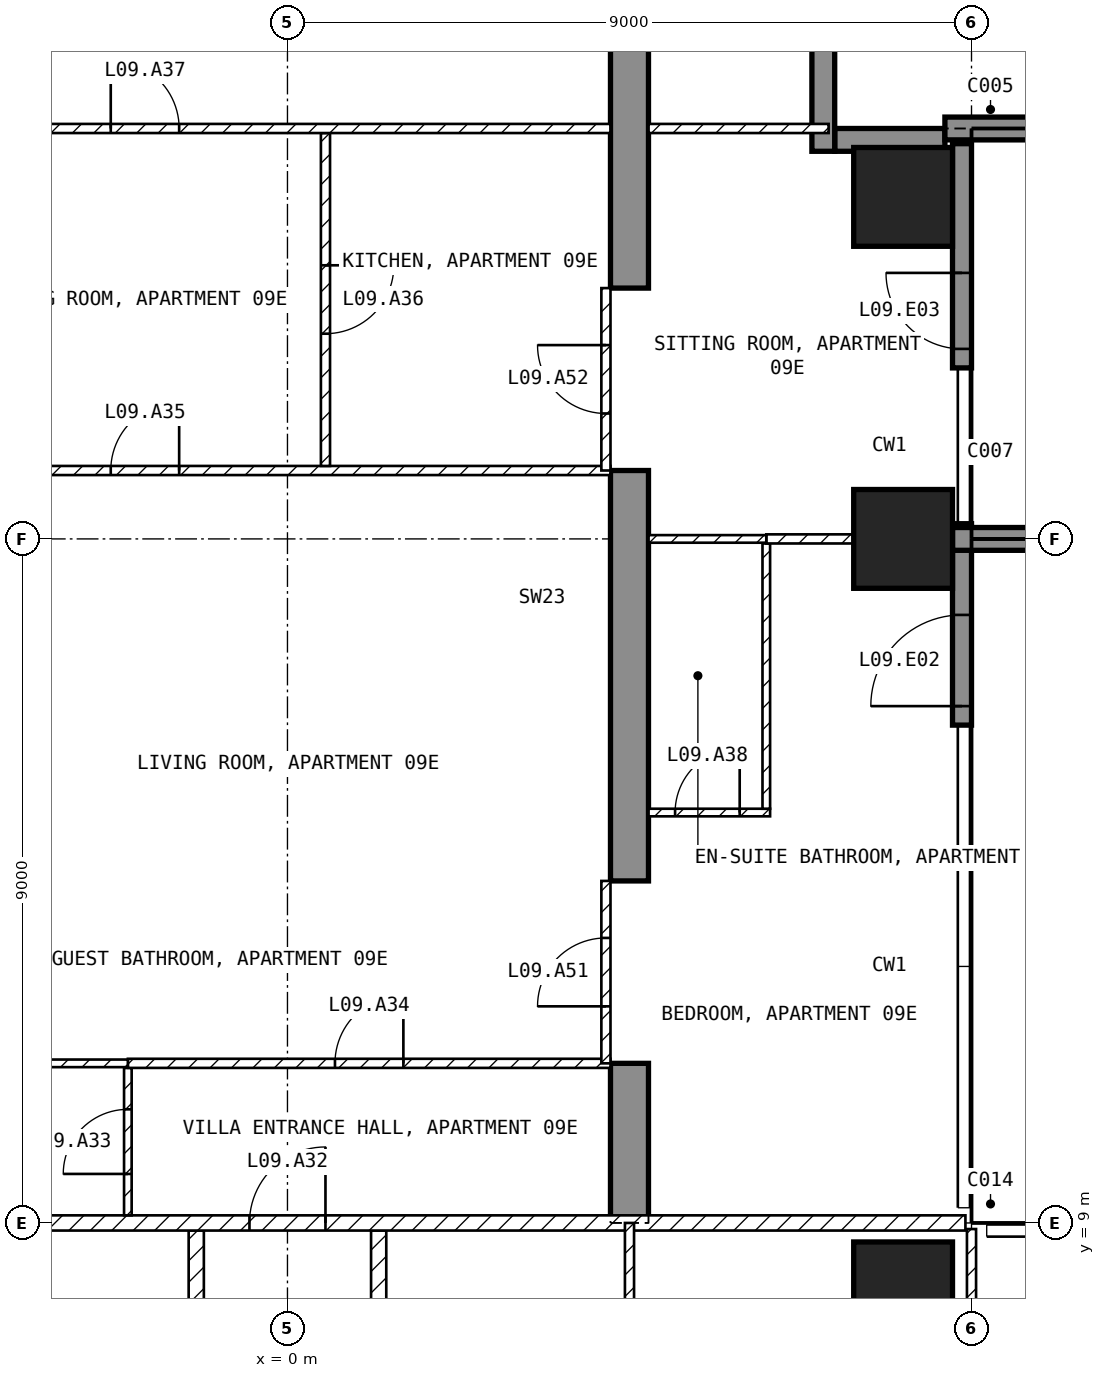
"""IFC4 building model, lengths in metres.
Left out: names, types, materials, properties, quantities, classifications, styles, units other than length and angle.
Written with IfcOpenShell. Run it as: python <this file> out.ifc"""

import sys

from ifc_helpers import new_model, si_unit, direction, frame, frame_2d, origin, origin_2d, place, context, subcontext, project, spatial, polyline, rectangle, outline, extrude, element, fill, save


model = new_model("IFC4")
c1 = context("Model", 3, precision=1e-05, world=origin(), true_north=direction((0.0, 1.0)))
c2 = subcontext(c1, "Body", "Model", "MODEL_VIEW")
j1 = project(units=[si_unit("LENGTHUNIT", "METRE"), si_unit("PLANEANGLEUNIT", "RADIAN")], contexts=[c1])
p1 = place(None, origin())
s1 = spatial("IfcSite", under=j1, at=p1, CompositionType="ELEMENT")
p2 = place(p1, origin())
s2 = spatial("IfcBuilding", under=s1, at=p2, CompositionType="ELEMENT")
p3 = place(p2, frame((0.0, 0.0, 50.5)))
s3 = spatial("IfcBuildingStorey", under=s2, at=p3, CompositionType="ELEMENT", Elevation=50.5)
for number, where, z_axis, x_axis in (
    (1, (8.1, 8.1, -0.25), (0.0, 0.0, 1.0), (1.0, 0.0, 0.0)),
    (2, (8.1, 18.0, -0.25), (0.0, 0.0, 1.0), (1.0, 0.0, 0.0)),
    (3, (8.1, 22.5, -0.25), (0.0, 0.0, 1.0), (1.0, 0.0, 0.0)),
):
    element("IfcColumn", number, at=place(p3, frame(where, z_axis=z_axis, x_axis=x_axis)), inside=s3, PredefinedType="COLUMN", context=c2, shape_type="SweptSolid", body=[
        extrude(rectangle(XDim=1.3, YDim=1.3, at=origin_2d()), origin(), (0.0, 0.0, 1.0), 3.5),
    ])
p4 = place(p3, frame((4.25, 9.0, -0.25), z_axis=(1.0, 0.0, 0.0), x_axis=(0.0, 1.0, 0.0)))
e4 = element("IfcWall", 4, at=p4, inside=s3, PredefinedType="SHEAR", context=c2, shape_type="SweptSolid", body=[
    extrude(outline(polyline([(0.0, 0.0), (2.1, 0.0), (2.1, 2.65), (4.5, 2.65), (4.5, 0.0), (9.9, 0.0), (9.9, 2.65), (12.3, 2.65), (12.3, 0.0), (16.45, 0.0), (16.45, 3.5), (0.0, 3.5), (0.0, 0.0)])), origin(), (0.0, 0.0, 1.0), 0.5),
])
p5 = place(p3, frame((8.875, 15.55, 0.0), z_axis=(0.0, 0.0, 1.0), x_axis=(0.0, 1.0, 0.0)))
e5 = element("IfcWall", 5, at=p5, inside=s3, PredefinedType="SOLIDWALL", context=c2, shape_type="SweptSolid", body=[
    extrude(rectangle(XDim=2.65, YDim=0.25, at=frame_2d((1.325, 0.0))), origin(), (0.0, 0.0, 1.0), 3.25),
])
p6 = place(p5, frame((0.25, 0.0, 0.0)))
e6 = element("IfcOpeningElement", 6, at=p6, cuts=e5, PredefinedType="OPENING", context=c2, shape_type="SweptSolid", body=[
    extrude(rectangle(XDim=1.2, YDim=2.4, at=frame_2d((0.6, 1.2))), frame((0.0, 0.135, 0.0), z_axis=(0.0, -1.0, 0.0), x_axis=(1.0, 0.0, 0.0)), (0.0, 0.0, 1.0), 0.27),
])
p7 = place(p3, frame((8.875, 20.25, 0.0), z_axis=(0.0, 0.0, 1.0), x_axis=(0.0, 1.0, 0.0)))
e7 = element("IfcWall", 7, at=p7, inside=s3, PredefinedType="SOLIDWALL", context=c2, shape_type="SweptSolid", body=[
    extrude(rectangle(XDim=2.95, YDim=0.25, at=frame_2d((1.475, 0.0))), origin(), (0.0, 0.0, 1.0), 3.25),
])
p8 = place(p7, frame((0.25, 0.0, 0.0)))
e8 = element("IfcOpeningElement", 8, at=p8, cuts=e7, PredefinedType="OPENING", context=c2, shape_type="SweptSolid", body=[
    extrude(rectangle(XDim=1.0, YDim=2.4, at=frame_2d((0.5, 1.2))), frame((0.0, 0.135, 0.0), z_axis=(0.0, -1.0, 0.0), x_axis=(1.0, 0.0, 0.0)), (0.0, 0.0, 1.0), 0.27),
])
p9 = place(p3, frame((8.65, 23.25, 0.0), z_axis=(0.0, 0.0, 1.0), x_axis=(-1.0, 0.0, 0.0)))
e9 = element("IfcWall", 9, at=p9, inside=s3, PredefinedType="SOLIDWALL", context=c2, shape_type="SweptSolid", body=[
    extrude(rectangle(XDim=1.45, YDim=0.3, at=frame_2d((0.725, 0.0))), origin(), (0.0, 0.0, 1.0), 3.25),
])
p10 = place(p3, frame((7.05, 23.1, 0.0), z_axis=(0.0, 0.0, 1.0), x_axis=(0.0, 1.0, 0.0)))
e10 = element("IfcWall", 10, at=p10, inside=s3, PredefinedType="SOLIDWALL", context=c2, shape_type="SweptSolid", body=[
    extrude(rectangle(XDim=1.8, YDim=0.3, at=frame_2d((0.9, 0.0))), origin(), (0.0, 0.0, 1.0), 3.25),
])
p11 = place(p3, frame((8.75, 18.0, 0.0), z_axis=(0.0, 0.0, 1.0), x_axis=(1.0, 0.0, 0.0)))
e11 = element("IfcWall", 11, at=p11, inside=s3, PredefinedType="SOLIDWALL", context=c2, shape_type="SweptSolid", body=[
    extrude(rectangle(XDim=2.95, YDim=0.3, at=frame_2d((1.475, 0.0))), origin(), (0.0, 0.0, 1.0), 3.25),
])
p12 = place(p3, frame((8.65, 23.4, 0.0), z_axis=(0.0, 0.0, 1.0), x_axis=(1.0, 0.0, 0.0)))
e12 = element("IfcWall", 12, at=p12, inside=s3, PredefinedType="SOLIDWALL", context=c2, shape_type="SweptSolid", body=[
    extrude(rectangle(XDim=3.05, YDim=0.3, at=frame_2d((1.525, 0.0))), origin(), (0.0, 0.0, 1.0), 3.25),
])
for number, where, z_axis, x_axis in (
    (13, (1.2, 8.9, 0.0), (0.0, 0.0, 1.0), (0.0, -1.0, 0.0)),
    (14, (-1.2, 1.3, 0.0), (0.0, 0.0, 1.0), (0.0, 1.0, 0.0)),
):
    element("IfcWall", number, at=place(p3, frame(where, z_axis=z_axis, x_axis=x_axis)), inside=s3, PredefinedType="PARTITIONING", context=c2, shape_type="SweptSolid", body=[
        extrude(rectangle(XDim=7.6, YDim=0.2, at=frame_2d((3.8, 0.0))), origin(), (0.0, 0.0, 1.0), 3.25),
    ])
p13 = place(p3, frame((-8.92, 9.0, 0.0), z_axis=(0.0, 0.0, 1.0), x_axis=(1.0, 0.0, 0.0)))
e15 = element("IfcWall", 15, at=p13, inside=s3, PredefinedType="PARTITIONING", context=c2, shape_type="SweptSolid", body=[
    extrude(rectangle(XDim=17.84, YDim=0.2, at=frame_2d((8.92, 0.0))), origin(), (0.0, 0.0, 1.0), 3.25),
])
p14 = place(p13, frame((8.42, 0.0, 0.0)))
e16 = element("IfcOpeningElement", 16, at=p14, cuts=e15, PredefinedType="OPENING", context=c2, shape_type="SweptSolid", body=[
    extrude(rectangle(XDim=1.0, YDim=2.1, at=frame_2d((0.5, 1.05))), frame((0.0, 0.11, 0.0), z_axis=(0.0, -1.0, 0.0), x_axis=(1.0, 0.0, 0.0)), (0.0, 0.0, 1.0), 0.22),
])
p15 = place(p3, frame((9.0, 1.3, 0.0), z_axis=(0.0, 0.0, 1.0), x_axis=(0.0, 1.0, 0.0)))
e17 = element("IfcWall", 17, at=p15, inside=s3, PredefinedType="PARTITIONING", context=c2, shape_type="SweptSolid", body=[
    extrude(rectangle(XDim=7.62, YDim=0.12, at=frame_2d((3.81, 0.0))), origin(), (0.0, 0.0, 1.0), 3.25),
])
p16 = place(p15, frame((0.85, 0.0, 0.0)))
e18 = element("IfcOpeningElement", 18, at=p16, cuts=e17, PredefinedType="OPENING", context=c2, shape_type="SweptSolid", body=[
    extrude(rectangle(XDim=0.9, YDim=2.1, at=frame_2d((0.45, 1.05))), frame((0.0, 0.07, 0.0), z_axis=(0.0, -1.0, 0.0), x_axis=(1.0, 0.0, 0.0)), (0.0, 0.0, 1.0), 0.14),
])
p17 = place(p3, frame((4.5, 1.3, 0.0), z_axis=(0.0, 0.0, 1.0), x_axis=(0.0, 1.0, 0.0)))
e19 = element("IfcWall", 19, at=p17, inside=s3, PredefinedType="PARTITIONING", context=c2, shape_type="SweptSolid", body=[
    extrude(rectangle(XDim=7.7, YDim=0.12, at=frame_2d((3.85, 0.0))), origin(), (0.0, 0.0, 1.0), 3.25),
])
p18 = place(p17, frame((3.4, 0.0, 0.0)))
e20 = element("IfcOpeningElement", 20, at=p18, cuts=e19, PredefinedType="OPENING", context=c2, shape_type="SweptSolid", body=[
    extrude(rectangle(XDim=0.9, YDim=2.1, at=frame_2d((0.45, 1.05))), frame((0.0, 0.07, 0.0), z_axis=(0.0, -1.0, 0.0), x_axis=(1.0, 0.0, 0.0)), (0.0, 0.0, 1.0), 0.14),
])
p19 = place(p3, frame((-2.1, 9.1, 0.0), z_axis=(0.0, 0.0, 1.0), x_axis=(0.0, 1.0, 0.0)))
e21 = element("IfcWall", 21, at=p19, inside=s3, PredefinedType="PARTITIONING", context=c2, shape_type="SweptSolid", body=[
    extrude(rectangle(XDim=1.94, YDim=0.1, at=frame_2d((0.97, 0.0))), origin(), (0.0, 0.0, 1.0), 3.25),
])
p20 = place(p19, frame((0.545, 0.0, 0.0)))
e22 = element("IfcOpeningElement", 22, at=p20, cuts=e21, PredefinedType="OPENING", context=c2, shape_type="SweptSolid", body=[
    extrude(rectangle(XDim=0.85, YDim=2.1, at=frame_2d((0.425, 1.05))), frame((0.0, 0.06, 0.0), z_axis=(0.0, -1.0, 0.0), x_axis=(1.0, 0.0, 0.0)), (0.0, 0.0, 1.0), 0.12),
])
p21 = place(p3, frame((-2.1, 11.1, 0.0), z_axis=(0.0, 0.0, 1.0), x_axis=(1.0, 0.0, 0.0)))
e23 = element("IfcWall", 23, at=p21, inside=s3, PredefinedType="PARTITIONING", context=c2, shape_type="SweptSolid", body=[
    extrude(rectangle(XDim=6.35, YDim=0.12, at=frame_2d((3.175, 0.0))), origin(), (0.0, 0.0, 1.0), 3.25),
])
p22 = place(p21, frame((2.725, 0.0, 0.0)))
e24 = element("IfcOpeningElement", 24, at=p22, cuts=e23, PredefinedType="OPENING", context=c2, shape_type="SweptSolid", body=[
    extrude(rectangle(XDim=0.9, YDim=2.1, at=frame_2d((0.45, 1.05))), frame((0.0, 0.07, 0.0), z_axis=(0.0, -1.0, 0.0), x_axis=(1.0, 0.0, 0.0)), (0.0, 0.0, 1.0), 0.14),
])
p23 = place(p3, frame((-4.25, 11.1, 0.0), z_axis=(0.0, 0.0, 1.0), x_axis=(1.0, 0.0, 0.0)))
e25 = element("IfcWall", 25, at=p23, inside=s3, PredefinedType="PARTITIONING", context=c2, shape_type="SweptSolid", body=[
    extrude(rectangle(XDim=2.15, YDim=0.1, at=frame_2d((1.075, 0.0))), origin(), (0.0, 0.0, 1.0), 3.25),
])
p24 = place(p3, frame((-4.25, 18.9, 0.0), z_axis=(0.0, 0.0, 1.0), x_axis=(1.0, 0.0, 0.0)))
e26 = element("IfcWall", 26, at=p24, inside=s3, PredefinedType="PARTITIONING", context=c2, shape_type="SweptSolid", body=[
    extrude(rectangle(XDim=8.5, YDim=0.12, at=frame_2d((4.25, 0.0))), origin(), (0.0, 0.0, 1.0), 3.25),
])
p25 = place(p24, frame((1.925, 0.0, 0.0)))
e27 = element("IfcOpeningElement", 27, at=p25, cuts=e26, PredefinedType="OPENING", context=c2, shape_type="SweptSolid", body=[
    extrude(rectangle(XDim=0.9, YDim=2.1, at=frame_2d((0.45, 1.05))), frame((0.0, 0.07, 0.0), z_axis=(0.0, -1.0, 0.0), x_axis=(1.0, 0.0, 0.0)), (0.0, 0.0, 1.0), 0.14),
])
p26 = place(p3, frame((0.5, 23.34, 0.0), z_axis=(0.0, 0.0, 1.0), x_axis=(0.0, -1.0, 0.0)))
e28 = element("IfcWall", 28, at=p26, inside=s3, PredefinedType="PARTITIONING", context=c2, shape_type="SweptSolid", body=[
    extrude(rectangle(XDim=4.38, YDim=0.12, at=frame_2d((2.19, 0.0))), origin(), (0.0, 0.0, 1.0), 3.25),
])
p27 = place(p26, frame((1.74, 0.0, 0.0)))
e29 = element("IfcOpeningElement", 29, at=p27, cuts=e28, PredefinedType="OPENING", context=c2, shape_type="SweptSolid", body=[
    extrude(rectangle(XDim=0.9, YDim=2.1, at=frame_2d((0.45, 1.05))), frame((0.0, 0.07, 0.0), z_axis=(0.0, -1.0, 0.0), x_axis=(1.0, 0.0, 0.0)), (0.0, 0.0, 1.0), 0.14),
])
p28 = place(p3, frame((-4.25, 23.4, 0.0), z_axis=(0.0, 0.0, 1.0), x_axis=(1.0, 0.0, 0.0)))
e30 = element("IfcWall", 30, at=p28, inside=s3, PredefinedType="PARTITIONING", context=c2, shape_type="SweptSolid", body=[
    extrude(rectangle(XDim=8.5, YDim=0.12, at=frame_2d((4.25, 0.0))), origin(), (0.0, 0.0, 1.0), 3.25),
])
p29 = place(p28, frame((1.925, 0.0, 0.0)))
e31 = element("IfcOpeningElement", 31, at=p29, cuts=e30, PredefinedType="OPENING", context=c2, shape_type="SweptSolid", body=[
    extrude(rectangle(XDim=0.9, YDim=2.1, at=frame_2d((0.45, 1.05))), frame((0.0, 0.07, 0.0), z_axis=(0.0, -1.0, 0.0), x_axis=(1.0, 0.0, 0.0)), (0.0, 0.0, 1.0), 0.14),
])
p30 = place(p3, frame((4.75, 14.4, 0.0), z_axis=(0.0, 0.0, 1.0), x_axis=(1.0, 0.0, 0.0)))
e32 = element("IfcWall", 32, at=p30, inside=s3, PredefinedType="PARTITIONING", context=c2, shape_type="SweptSolid", body=[
    extrude(rectangle(XDim=1.6, YDim=0.1, at=frame_2d((0.8, 0.0))), origin(), (0.0, 0.0, 1.0), 3.25),
])
p31 = place(p30, frame((0.35, 0.0, 0.0)))
e33 = element("IfcOpeningElement", 33, at=p31, cuts=e32, PredefinedType="OPENING", context=c2, shape_type="SweptSolid", body=[
    extrude(rectangle(XDim=0.85, YDim=2.1, at=frame_2d((0.425, 1.05))), frame((0.0, 0.06, 0.0), z_axis=(0.0, -1.0, 0.0), x_axis=(1.0, 0.0, 0.0)), (0.0, 0.0, 1.0), 0.12),
])
p32 = place(p3, frame((6.3, 14.45, 0.0), z_axis=(0.0, 0.0, 1.0), x_axis=(0.0, 1.0, 0.0)))
e34 = element("IfcWall", 34, at=p32, inside=s3, PredefinedType="PARTITIONING", context=c2, shape_type="SweptSolid", body=[
    extrude(rectangle(XDim=3.49, YDim=0.1, at=frame_2d((1.745, 0.0))), origin(), (0.0, 0.0, 1.0), 3.25),
])
p33 = place(p3, frame((6.3, 18.0, 0.0), z_axis=(0.0, 0.0, 1.0), x_axis=(1.0, 0.0, 0.0)))
e35 = element("IfcWall", 35, at=p33, inside=s3, PredefinedType="PARTITIONING", context=c2, shape_type="SweptSolid", body=[
    extrude(rectangle(XDim=1.15, YDim=0.12, at=frame_2d((0.575, 0.0))), origin(), (0.0, 0.0, 1.0), 2.346),
])
p34 = place(p3, frame((4.75, 18.0, 0.0), z_axis=(0.0, 0.0, 1.0), x_axis=(1.0, 0.0, 0.0)))
e36 = element("IfcWall", 36, at=p34, inside=s3, PredefinedType="PARTITIONING", context=c2, shape_type="SweptSolid", body=[
    extrude(rectangle(XDim=1.55, YDim=0.1, at=frame_2d((0.775, 0.0))), origin(), (0.0, 0.0, 1.0), 2.346),
])
p35 = place(p3, frame((4.75, 23.4, 0.0), z_axis=(0.0, 0.0, 1.0), x_axis=(1.0, 0.0, 0.0)))
e37 = element("IfcWall", 37, at=p35, inside=s3, PredefinedType="PARTITIONING", context=c2, shape_type="SweptSolid", body=[
    extrude(rectangle(XDim=2.37, YDim=0.12, at=frame_2d((1.185, 0.0))), origin(), (0.0, 0.0, 1.0), 3.25),
])
p36 = place(p3, frame((4.19, 11.1, 0.0), z_axis=(0.0, 0.0, 1.0), x_axis=(0.0, 1.0, 0.0)))
e38 = element("IfcWall", 38, at=p36, inside=s3, PredefinedType="PARTITIONING", context=c2, shape_type="SweptSolid", body=[
    extrude(rectangle(XDim=2.4, YDim=0.12, at=frame_2d((1.2, 0.0))), origin(), (0.0, 0.0, 1.0), 2.4),
])
p37 = place(p36, frame((0.75, 0.0, 0.0)))
e39 = element("IfcOpeningElement", 39, at=p37, cuts=e38, PredefinedType="OPENING", context=c2, shape_type="SweptSolid", body=[
    extrude(rectangle(XDim=0.9, YDim=2.1, at=frame_2d((0.45, 1.05))), frame((0.0, 0.07, 0.0), z_axis=(0.0, -1.0, 0.0), x_axis=(1.0, 0.0, 0.0)), (0.0, 0.0, 1.0), 0.14),
])
p38 = place(p3, frame((4.19, 18.9, 0.0), z_axis=(0.0, 0.0, 1.0), x_axis=(0.0, 1.0, 0.0)))
e40 = element("IfcWall", 40, at=p38, inside=s3, PredefinedType="PARTITIONING", context=c2, shape_type="SweptSolid", body=[
    extrude(rectangle(XDim=2.4, YDim=0.12, at=frame_2d((1.2, 0.0))), origin(), (0.0, 0.0, 1.0), 2.4),
])
p39 = place(p38, frame((0.75, 0.0, 0.0)))
e41 = element("IfcOpeningElement", 41, at=p39, cuts=e40, PredefinedType="OPENING", context=c2, shape_type="SweptSolid", body=[
    extrude(rectangle(XDim=0.9, YDim=2.1, at=frame_2d((0.45, 1.05))), frame((0.0, 0.07, 0.0), z_axis=(0.0, -1.0, 0.0), x_axis=(1.0, 0.0, 0.0)), (0.0, 0.0, 1.0), 0.14),
])
p40 = place(p6, origin())
e42 = element("IfcDoor", 42, at=p40, inside=s3, OperationType="SINGLE_SWING_LEFT", PredefinedType="DOOR", context=c2, shape_type="SweptSolid", body=[
    extrude(rectangle(XDim=1.2, YDim=2.4, at=frame_2d((0.6, 1.2))), frame((0.0, 0.025, 0.0), z_axis=(0.0, -1.0, 0.0), x_axis=(1.0, 0.0, 0.0)), (0.0, 0.0, 1.0), 0.05),
])
fill(e6, e42)
p41 = place(p8, origin())
e43 = element("IfcDoor", 43, at=p41, inside=s3, OperationType="SINGLE_SWING_RIGHT", PredefinedType="DOOR", context=c2, shape_type="SweptSolid", body=[
    extrude(rectangle(XDim=1.0, YDim=2.4, at=frame_2d((0.5, 1.2))), frame((0.0, 0.025, 0.0), z_axis=(0.0, -1.0, 0.0), x_axis=(1.0, 0.0, 0.0)), (0.0, 0.0, 1.0), 0.05),
])
fill(e8, e43)
p42 = place(p14, origin())
e44 = element("IfcDoor", 44, at=p42, inside=s3, OperationType="SINGLE_SWING_RIGHT", PredefinedType="DOOR", context=c2, shape_type="SweptSolid", body=[
    extrude(rectangle(XDim=1.0, YDim=2.1, at=frame_2d((0.5, 1.05))), frame((0.0, 0.025, 0.0), z_axis=(0.0, -1.0, 0.0), x_axis=(1.0, 0.0, 0.0)), (0.0, 0.0, 1.0), 0.05),
])
fill(e16, e44)
p43 = place(p20, origin())
e45 = element("IfcDoor", 45, at=p43, inside=s3, OperationType="SINGLE_SWING_LEFT", PredefinedType="DOOR", context=c2, shape_type="SweptSolid", body=[
    extrude(rectangle(XDim=0.85, YDim=2.1, at=frame_2d((0.425, 1.05))), frame((0.0, 0.025, 0.0), z_axis=(0.0, -1.0, 0.0), x_axis=(1.0, 0.0, 0.0)), (0.0, 0.0, 1.0), 0.05),
])
fill(e22, e45)
p44 = place(p22, origin())
e46 = element("IfcDoor", 46, at=p44, inside=s3, OperationType="SINGLE_SWING_RIGHT", PredefinedType="DOOR", context=c2, shape_type="SweptSolid", body=[
    extrude(rectangle(XDim=0.9, YDim=2.1, at=frame_2d((0.45, 1.05))), frame((0.0, 0.025, 0.0), z_axis=(0.0, -1.0, 0.0), x_axis=(1.0, 0.0, 0.0)), (0.0, 0.0, 1.0), 0.05),
])
fill(e24, e46)
p45 = place(p25, origin())
e47 = element("IfcDoor", 47, at=p45, inside=s3, OperationType="SINGLE_SWING_RIGHT", PredefinedType="DOOR", context=c2, shape_type="SweptSolid", body=[
    extrude(rectangle(XDim=0.9, YDim=2.1, at=frame_2d((0.45, 1.05))), frame((0.0, 0.025, 0.0), z_axis=(0.0, -1.0, 0.0), x_axis=(1.0, 0.0, 0.0)), (0.0, 0.0, 1.0), 0.05),
])
fill(e27, e47)
p46 = place(p27, origin())
e48 = element("IfcDoor", 48, at=p46, inside=s3, OperationType="SINGLE_SWING_LEFT", PredefinedType="DOOR", context=c2, shape_type="SweptSolid", body=[
    extrude(rectangle(XDim=0.9, YDim=2.1, at=frame_2d((0.45, 1.05))), frame((0.0, 0.025, 0.0), z_axis=(0.0, -1.0, 0.0), x_axis=(1.0, 0.0, 0.0)), (0.0, 0.0, 1.0), 0.05),
])
fill(e29, e48)
p47 = place(p29, origin())
e49 = element("IfcDoor", 49, at=p47, inside=s3, OperationType="SINGLE_SWING_LEFT", PredefinedType="DOOR", context=c2, shape_type="SweptSolid", body=[
    extrude(rectangle(XDim=0.9, YDim=2.1, at=frame_2d((0.45, 1.05))), frame((0.0, 0.025, 0.0), z_axis=(0.0, -1.0, 0.0), x_axis=(1.0, 0.0, 0.0)), (0.0, 0.0, 1.0), 0.05),
])
fill(e31, e49)
p48 = place(p31, origin())
e50 = element("IfcDoor", 50, at=p48, inside=s3, OperationType="SINGLE_SWING_RIGHT", PredefinedType="DOOR", context=c2, shape_type="SweptSolid", body=[
    extrude(rectangle(XDim=0.85, YDim=2.1, at=frame_2d((0.425, 1.05))), frame((0.0, 0.025, 0.0), z_axis=(0.0, -1.0, 0.0), x_axis=(1.0, 0.0, 0.0)), (0.0, 0.0, 1.0), 0.05),
])
fill(e33, e50)
p49 = place(p37, origin())
e51 = element("IfcDoor", 51, at=p49, inside=s3, OperationType="SINGLE_SWING_LEFT", PredefinedType="DOOR", context=c2, shape_type="SweptSolid", body=[
    extrude(rectangle(XDim=0.9, YDim=2.1, at=frame_2d((0.45, 1.05))), frame((0.0, 0.025, 0.0), z_axis=(0.0, -1.0, 0.0), x_axis=(1.0, 0.0, 0.0)), (0.0, 0.0, 1.0), 0.05),
])
fill(e39, e51)
p50 = place(p39, origin())
e52 = element("IfcDoor", 52, at=p50, inside=s3, OperationType="SINGLE_SWING_RIGHT", PredefinedType="DOOR", context=c2, shape_type="SweptSolid", body=[
    extrude(rectangle(XDim=0.9, YDim=2.1, at=frame_2d((0.45, 1.05))), frame((0.0, 0.025, 0.0), z_axis=(0.0, -1.0, 0.0), x_axis=(1.0, 0.0, 0.0)), (0.0, 0.0, 1.0), 0.05),
])
fill(e41, e52)
save(model, sys.argv[1])
